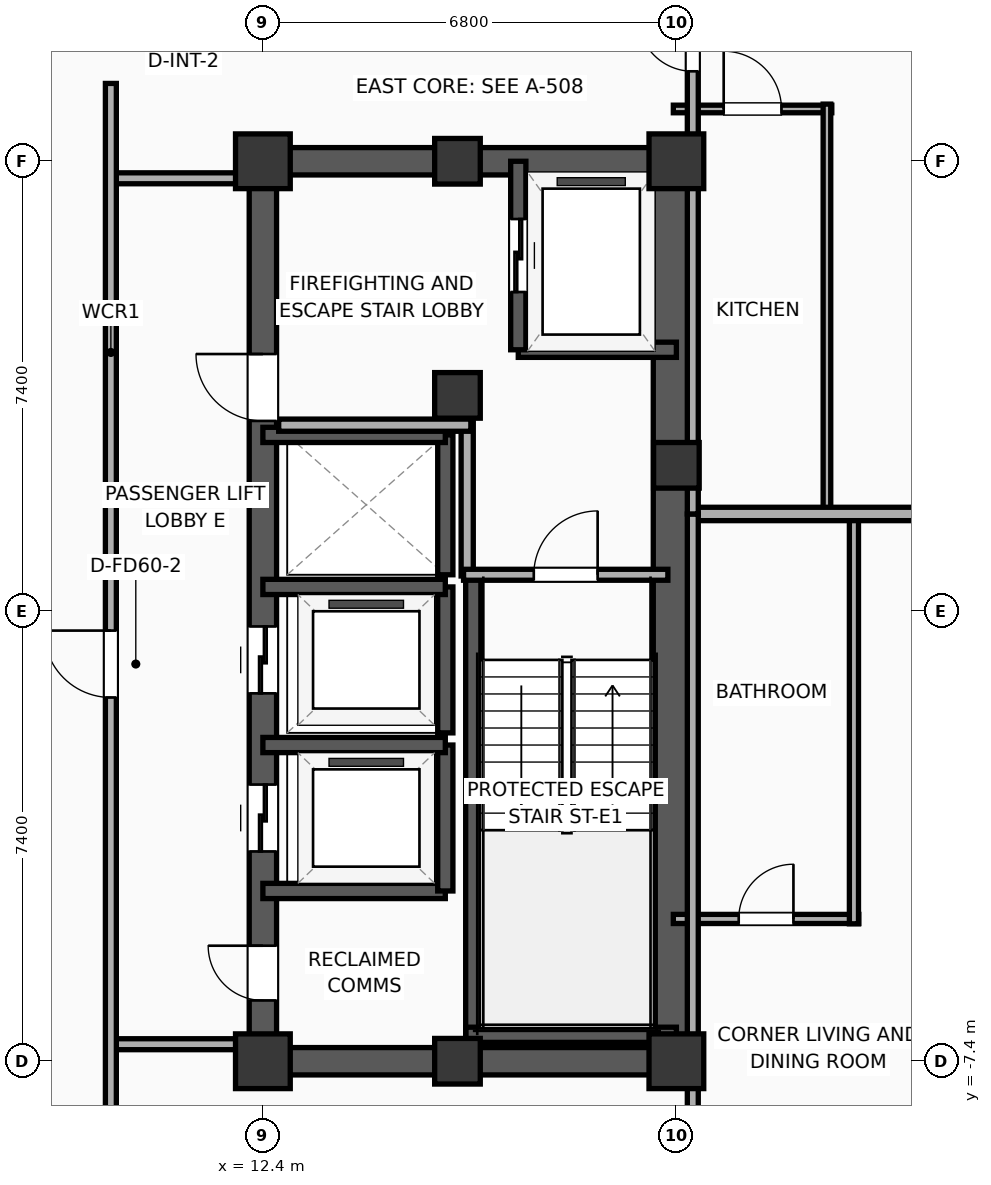
"""IFC4 building model, lengths in metres.
Left out: names, types, materials, properties, quantities, classifications, styles, units other than length and angle.
Written with IfcOpenShell. Run it as: python <this file> out.ifc"""

import sys

from ifc_helpers import new_model, si_unit, direction, frame, frame_2d, origin, origin_2d, place, context, subcontext, project, spatial, rectangle, extrude, element, fill, save


model = new_model("IFC4")
c1 = context("Model", 3, precision=1e-05, world=origin(), true_north=direction((0.0, 1.0)))
c2 = subcontext(c1, "Body", "Model", "MODEL_VIEW")
j1 = project(units=[si_unit("LENGTHUNIT", "METRE"), si_unit("PLANEANGLEUNIT", "RADIAN")], contexts=[c1])
p1 = place(None, origin())
s1 = spatial("IfcSite", under=j1, at=p1, CompositionType="ELEMENT")
p2 = place(p1, origin())
s2 = spatial("IfcBuilding", under=s1, at=p2, CompositionType="ELEMENT")
p3 = place(p2, frame((0.0, 0.0, 167.7)))
s3 = spatial("IfcBuildingStorey", under=s2, at=p3, CompositionType="ELEMENT", Elevation=167.7)
p4 = place(p3, frame((12.4, -7.4, 0.0), z_axis=(0.0, 0.0, 1.0), x_axis=(1.0, 0.0, 0.0)))
e1 = element("IfcColumn", 1, at=p4, inside=s3, PredefinedType="COLUMN", context=c2, shape_type="SweptSolid", body=[
    extrude(rectangle(XDim=0.9, YDim=0.9, at=origin_2d()), origin(), (0.0, 0.0, 1.0), 3.9),
])
p5 = place(p3, frame((15.6, 3.55, 0.0), z_axis=(0.0, 0.0, 1.0), x_axis=(1.0, 0.0, 0.0)))
e2 = element("IfcColumn", 2, at=p5, inside=s3, PredefinedType="COLUMN", context=c2, shape_type="SweptSolid", body=[
    extrude(rectangle(XDim=0.75, YDim=0.75, at=origin_2d()), origin(), (0.0, 0.0, 1.0), 3.9),
])
p6 = place(p3, frame((12.4, 7.4, 0.0), z_axis=(0.0, 0.0, 1.0), x_axis=(1.0, 0.0, 0.0)))
e3 = element("IfcColumn", 3, at=p6, inside=s3, PredefinedType="COLUMN", context=c2, shape_type="SweptSolid", body=[
    extrude(rectangle(XDim=0.9, YDim=0.9, at=origin_2d()), origin(), (0.0, 0.0, 1.0), 3.9),
])
for number, where, z_axis, x_axis in (
    (4, (15.6, -7.4, 0.0), (0.0, 0.0, 1.0), (1.0, 0.0, 0.0)),
    (5, (15.6, 7.4, 0.0), (0.0, 0.0, 1.0), (1.0, 0.0, 0.0)),
):
    element("IfcColumn", number, at=place(p3, frame(where, z_axis=z_axis, x_axis=x_axis)), inside=s3, PredefinedType="COLUMN", context=c2, shape_type="SweptSolid", body=[
        extrude(rectangle(XDim=0.75, YDim=0.75, at=origin_2d()), origin(), (0.0, 0.0, 1.0), 3.9),
    ])
p7 = place(p3, frame((19.2, -7.4, 0.0), z_axis=(0.0, 0.0, 1.0), x_axis=(1.0, 0.0, 0.0)))
e6 = element("IfcColumn", 6, at=p7, inside=s3, PredefinedType="COLUMN", context=c2, shape_type="SweptSolid", body=[
    extrude(rectangle(XDim=0.9, YDim=0.9, at=origin_2d()), origin(), (0.0, 0.0, 1.0), 3.9),
])
p8 = place(p3, frame((19.2, 2.4, 0.0), z_axis=(0.0, 0.0, 1.0), x_axis=(1.0, 0.0, 0.0)))
e7 = element("IfcColumn", 7, at=p8, inside=s3, PredefinedType="COLUMN", context=c2, shape_type="SweptSolid", body=[
    extrude(rectangle(XDim=0.75, YDim=0.75, at=origin_2d()), origin(), (0.0, 0.0, 1.0), 3.9),
])
p9 = place(p3, frame((19.2, 7.4, 0.0), z_axis=(0.0, 0.0, 1.0), x_axis=(1.0, 0.0, 0.0)))
e8 = element("IfcColumn", 8, at=p9, inside=s3, PredefinedType="COLUMN", context=c2, shape_type="SweptSolid", body=[
    extrude(rectangle(XDim=0.9, YDim=0.9, at=origin_2d()), origin(), (0.0, 0.0, 1.0), 3.9),
])
for number, where, z_axis, x_axis in (
    (9, (12.175, -7.4, 0.0), (0.0, 0.0, 1.0), (1.0, 0.0, 0.0)),
    (10, (12.175, 7.4, 0.0), (0.0, 0.0, 1.0), (1.0, 0.0, 0.0)),
):
    element("IfcWall", number, at=place(p3, frame(where, z_axis=z_axis, x_axis=x_axis)), inside=s3, PredefinedType="SHEAR", context=c2, shape_type="SweptSolid", body=[
        extrude(rectangle(XDim=7.25, YDim=0.45, at=frame_2d((3.625, 0.0))), origin(), (0.0, 0.0, 1.0), 3.65),
    ])
p10 = place(p3, frame((12.4, -7.4, 0.0), z_axis=(0.0, 0.0, 1.0), x_axis=(0.0, 1.0, 0.0)))
e11 = element("IfcWall", 11, at=p10, inside=s3, PredefinedType="SHEAR", context=c2, shape_type="SweptSolid", body=[
    extrude(rectangle(XDim=14.8, YDim=0.45, at=frame_2d((7.4, 0.0))), origin(), (0.0, 0.0, 1.0), 3.65),
])
p11 = place(p10, frame((3.45, 0.0, 0.0)))
e12 = element("IfcOpeningElement", 12, at=p11, cuts=e11, PredefinedType="OPENING", context=c2, shape_type="SweptSolid", body=[
    extrude(rectangle(XDim=1.1, YDim=2.05, at=frame_2d((0.55, 1.025))), frame((0.0, 0.235, 0.0), z_axis=(0.0, -1.0, 0.0), x_axis=(1.0, 0.0, 0.0)), (0.0, 0.0, 1.0), 0.47),
])
p12 = place(p10, frame((6.05, 0.0, 0.0)))
e13 = element("IfcOpeningElement", 13, at=p12, cuts=e11, PredefinedType="OPENING", context=c2, shape_type="SweptSolid", body=[
    extrude(rectangle(XDim=1.1, YDim=2.05, at=frame_2d((0.55, 1.025))), frame((0.0, 0.235, 0.0), z_axis=(0.0, -1.0, 0.0), x_axis=(1.0, 0.0, 0.0)), (0.0, 0.0, 1.0), 0.47),
])
p13 = place(p10, frame((10.53, 0.0, 0.0)))
e14 = element("IfcOpeningElement", 14, at=p13, cuts=e11, PredefinedType="OPENING", context=c2, shape_type="SweptSolid", body=[
    extrude(rectangle(XDim=1.1, YDim=2.05, at=frame_2d((0.55, 1.025))), frame((0.0, 0.235, 0.0), z_axis=(0.0, -1.0, 0.0), x_axis=(1.0, 0.0, 0.0)), (0.0, 0.0, 1.0), 0.47),
])
p14 = place(p10, frame((1.0, 0.0, 0.0)))
e15 = element("IfcOpeningElement", 15, at=p14, cuts=e11, PredefinedType="OPENING", context=c2, shape_type="SweptSolid", body=[
    extrude(rectangle(XDim=0.9, YDim=2.05, at=frame_2d((0.45, 1.025))), frame((0.0, 0.235, 0.0), z_axis=(0.0, -1.0, 0.0), x_axis=(1.0, 0.0, 0.0)), (0.0, 0.0, 1.0), 0.47),
])
p15 = place(p3, frame((19.145, -7.4, 0.0), z_axis=(0.0, 0.0, 1.0), x_axis=(0.0, 1.0, 0.0)))
e16 = element("IfcWall", 16, at=p15, inside=s3, PredefinedType="SHEAR", context=c2, shape_type="SweptSolid", body=[
    extrude(rectangle(XDim=14.8, YDim=0.65, at=frame_2d((7.4, 0.0))), origin(), (0.0, 0.0, 1.0), 3.65),
])
p16 = place(p3, frame((15.86, -7.085, 0.0), z_axis=(0.0, 0.0, 1.0), x_axis=(0.0, 1.0, 0.0)))
e17 = element("IfcWall", 17, at=p16, inside=s3, PredefinedType="SOLIDWALL", context=c2, shape_type="SweptSolid", body=[
    extrude(rectangle(XDim=7.685, YDim=0.25, at=frame_2d((3.843, 0.0))), origin(), (0.0, 0.0, 1.0), 3.65),
])
p17 = place(p3, frame((15.74, -6.965, 0.0), z_axis=(0.0, 0.0, 1.0), x_axis=(1.0, 0.0, 0.0)))
e18 = element("IfcWall", 18, at=p17, inside=s3, PredefinedType="SOLIDWALL", context=c2, shape_type="SweptSolid", body=[
    extrude(rectangle(XDim=3.46, YDim=0.25, at=frame_2d((1.73, 0.0))), origin(), (0.0, 0.0, 1.0), 3.65),
])
p18 = place(p3, frame((16.6, 4.3, 0.0), z_axis=(0.0, 0.0, 1.0), x_axis=(1.0, 0.0, 0.0)))
e19 = element("IfcWall", 19, at=p18, inside=s3, PredefinedType="SOLIDWALL", context=c2, shape_type="SweptSolid", body=[
    extrude(rectangle(XDim=2.6, YDim=0.25, at=frame_2d((1.3, 0.0))), origin(), (0.0, 0.0, 1.0), 3.65),
])
p19 = place(p3, frame((16.6, 7.4, 0.0), z_axis=(0.0, 0.0, 1.0), x_axis=(0.0, -1.0, 0.0)))
e20 = element("IfcWall", 20, at=p19, inside=s3, PredefinedType="SOLIDWALL", context=c2, shape_type="SweptSolid", body=[
    extrude(rectangle(XDim=3.1, YDim=0.25, at=frame_2d((1.55, 0.0))), origin(), (0.0, 0.0, 1.0), 3.65),
])
p20 = place(p19, frame((0.95, 0.0, 0.0)))
e21 = element("IfcOpeningElement", 21, at=p20, cuts=e20, PredefinedType="OPENING", context=c2, shape_type="SweptSolid", body=[
    extrude(rectangle(XDim=1.2, YDim=2.05, at=frame_2d((0.6, 1.025))), frame((0.0, 0.135, 0.0), z_axis=(0.0, -1.0, 0.0), x_axis=(1.0, 0.0, 0.0)), (0.0, 0.0, 1.0), 0.27),
])
p21 = place(p3, frame((12.4, -4.6, 0.0), z_axis=(0.0, 0.0, 1.0), x_axis=(1.0, 0.0, 0.0)))
e22 = element("IfcWall", 22, at=p21, inside=s3, PredefinedType="SOLIDWALL", context=c2, shape_type="SweptSolid", body=[
    extrude(rectangle(XDim=3.0, YDim=0.25, at=frame_2d((1.5, 0.0))), origin(), (0.0, 0.0, 1.0), 3.65),
])
p22 = place(p3, frame((15.4, -4.6, 0.0), z_axis=(0.0, 0.0, 1.0), x_axis=(0.0, 1.0, 0.0)))
e23 = element("IfcWall", 23, at=p22, inside=s3, PredefinedType="SOLIDWALL", context=c2, shape_type="SweptSolid", body=[
    extrude(rectangle(XDim=2.4, YDim=0.25, at=frame_2d((1.2, 0.0))), origin(), (0.0, 0.0, 1.0), 3.65),
])
p23 = place(p3, frame((15.4, -2.2, 0.0), z_axis=(0.0, 0.0, 1.0), x_axis=(-1.0, 0.0, 0.0)))
e24 = element("IfcWall", 24, at=p23, inside=s3, PredefinedType="SOLIDWALL", context=c2, shape_type="SweptSolid", body=[
    extrude(rectangle(XDim=3.0, YDim=0.25, at=frame_2d((1.5, 0.0))), origin(), (0.0, 0.0, 1.0), 3.65),
])
p24 = place(p3, frame((15.4, -2.0, 0.0), z_axis=(0.0, 0.0, 1.0), x_axis=(0.0, 1.0, 0.0)))
e25 = element("IfcWall", 25, at=p24, inside=s3, PredefinedType="SOLIDWALL", context=c2, shape_type="SweptSolid", body=[
    extrude(rectangle(XDim=2.4, YDim=0.25, at=frame_2d((1.2, 0.0))), origin(), (0.0, 0.0, 1.0), 3.65),
])
p25 = place(p3, frame((15.4, 0.4, 0.0), z_axis=(0.0, 0.0, 1.0), x_axis=(-1.0, 0.0, 0.0)))
e26 = element("IfcWall", 26, at=p25, inside=s3, PredefinedType="SOLIDWALL", context=c2, shape_type="SweptSolid", body=[
    extrude(rectangle(XDim=3.0, YDim=0.25, at=frame_2d((1.5, 0.0))), origin(), (0.0, 0.0, 1.0), 3.65),
])
p26 = place(p3, frame((15.4, 0.6, 0.0), z_axis=(0.0, 0.0, 1.0), x_axis=(0.0, 1.0, 0.0)))
e27 = element("IfcWall", 27, at=p26, inside=s3, PredefinedType="SOLIDWALL", context=c2, shape_type="SweptSolid", body=[
    extrude(rectangle(XDim=2.3, YDim=0.25, at=frame_2d((1.15, 0.0))), origin(), (0.0, 0.0, 1.0), 3.65),
])
p27 = place(p3, frame((15.4, 2.9, 0.0), z_axis=(0.0, 0.0, 1.0), x_axis=(-1.0, 0.0, 0.0)))
e28 = element("IfcWall", 28, at=p27, inside=s3, PredefinedType="SOLIDWALL", context=c2, shape_type="SweptSolid", body=[
    extrude(rectangle(XDim=3.0, YDim=0.25, at=frame_2d((1.5, 0.0))), origin(), (0.0, 0.0, 1.0), 3.65),
])
p28 = place(p3, frame((15.76, 0.58, 0.0), z_axis=(0.0, 0.0, 1.0), x_axis=(0.0, 1.0, 0.0)))
e29 = element("IfcWall", 29, at=p28, inside=s3, PredefinedType="PARTITIONING", context=c2, shape_type="SweptSolid", body=[
    extrude(rectangle(XDim=2.52, YDim=0.2, at=frame_2d((1.26, 0.0))), origin(), (0.0, 0.0, 1.0), 3.65),
])
p29 = place(p3, frame((12.66, 3.06, 0.0), z_axis=(0.0, 0.0, 1.0), x_axis=(1.0, 0.0, 0.0)))
e30 = element("IfcWall", 30, at=p29, inside=s3, PredefinedType="PARTITIONING", context=c2, shape_type="SweptSolid", body=[
    extrude(rectangle(XDim=3.16, YDim=0.2, at=frame_2d((1.58, 0.0))), origin(), (0.0, 0.0, 1.0), 3.65),
])
p30 = place(p3, frame((15.7, 0.6, 0.0), z_axis=(0.0, 0.0, 1.0), x_axis=(1.0, 0.0, 0.0)))
e31 = element("IfcWall", 31, at=p30, inside=s3, PredefinedType="PARTITIONING", context=c2, shape_type="SweptSolid", body=[
    extrude(rectangle(XDim=3.36, YDim=0.18, at=frame_2d((1.68, 0.0))), origin(), (0.0, 0.0, 1.0), 3.65),
])
p31 = place(p30, frame((1.155, 0.0, 0.0)))
e32 = element("IfcOpeningElement", 32, at=p31, cuts=e31, PredefinedType="OPENING", context=c2, shape_type="SweptSolid", body=[
    extrude(rectangle(XDim=1.05, YDim=2.05, at=frame_2d((0.525, 1.025))), frame((0.0, 0.1, 0.0), z_axis=(0.0, -1.0, 0.0), x_axis=(1.0, 0.0, 0.0)), (0.0, 0.0, 1.0), 0.2),
])
for number, where, z_axis, x_axis in (
    (33, (9.88, 7.12, 0.0), (0.0, 0.0, 1.0), (1.0, 0.0, 0.0)),
    (34, (9.88, -7.12, 0.0), (0.0, 0.0, 1.0), (1.0, 0.0, 0.0)),
):
    element("IfcWall", number, at=place(p3, frame(where, z_axis=z_axis, x_axis=x_axis)), inside=s3, PredefinedType="PARTITIONING", context=c2, shape_type="SweptSolid", body=[
        extrude(rectangle(XDim=2.27, YDim=0.18, at=frame_2d((1.135, 0.0))), origin(), (0.0, 0.0, 1.0), 3.65),
    ])
p32 = place(p3, frame((9.9, -8.68, 0.0), z_axis=(0.0, 0.0, 1.0), x_axis=(0.0, 1.0, 0.0)))
e35 = element("IfcWall", 35, at=p32, inside=s3, PredefinedType="PARTITIONING", context=c2, shape_type="SweptSolid", body=[
    extrude(rectangle(XDim=17.36, YDim=0.18, at=frame_2d((8.68, 0.0))), origin(), (0.0, 0.0, 1.0), 3.65),
])
p33 = place(p32, frame((7.262, 0.0, 0.0)))
e36 = element("IfcOpeningElement", 36, at=p33, cuts=e35, PredefinedType="OPENING", context=c2, shape_type="SweptSolid", body=[
    extrude(rectangle(XDim=1.1, YDim=2.05, at=frame_2d((0.55, 1.025))), frame((0.0, 0.1, 0.0), z_axis=(0.0, -1.0, 0.0), x_axis=(1.0, 0.0, 0.0)), (0.0, 0.0, 1.0), 0.2),
])
p34 = place(p3, frame((19.15, -5.06, 0.0), z_axis=(0.0, 0.0, 1.0), x_axis=(1.0, 0.0, 0.0)))
e37 = element("IfcWall", 37, at=p34, inside=s3, PredefinedType="PLUMBINGWALL", context=c2, shape_type="SweptSolid", body=[
    extrude(rectangle(XDim=3.05, YDim=0.15, at=frame_2d((1.525, 0.0))), origin(), (0.0, 0.0, 1.0), 3.65),
])
p35 = place(p34, frame((1.075, 0.0, 0.0)))
e38 = element("IfcOpeningElement", 38, at=p35, cuts=e37, PredefinedType="OPENING", context=c2, shape_type="SweptSolid", body=[
    extrude(rectangle(XDim=0.9, YDim=2.05, at=frame_2d((0.45, 1.025))), frame((0.0, 0.085, 0.0), z_axis=(0.0, -1.0, 0.0), x_axis=(1.0, 0.0, 0.0)), (0.0, 0.0, 1.0), 0.17),
])
p36 = place(p3, frame((22.12, -5.14, 0.0), z_axis=(0.0, 0.0, 1.0), x_axis=(0.0, 1.0, 0.0)))
e39 = element("IfcWall", 39, at=p36, inside=s3, PredefinedType="PLUMBINGWALL", context=c2, shape_type="SweptSolid", body=[
    extrude(rectangle(XDim=6.72, YDim=0.15, at=frame_2d((3.36, 0.0))), origin(), (0.0, 0.0, 1.0), 3.65),
])
p37 = place(p3, frame((19.15, 8.26, 0.0), z_axis=(0.0, 0.0, 1.0), x_axis=(1.0, 0.0, 0.0)))
e40 = element("IfcWall", 40, at=p37, inside=s3, PredefinedType="PARTITIONING", context=c2, shape_type="SweptSolid", body=[
    extrude(rectangle(XDim=2.606, YDim=0.125, at=frame_2d((1.303, 0.0))), origin(), (0.0, 0.0, 1.0), 3.04),
])
p38 = place(p37, frame((0.828, 0.0, 0.0)))
e41 = element("IfcOpeningElement", 41, at=p38, cuts=e40, PredefinedType="OPENING", context=c2, shape_type="SweptSolid", body=[
    extrude(rectangle(XDim=0.95, YDim=2.05, at=frame_2d((0.475, 1.025))), frame((0.0, 0.073, 0.0), z_axis=(0.0, -1.0, 0.0), x_axis=(1.0, 0.0, 0.0)), (0.0, 0.0, 1.0), 0.145),
])
p39 = place(p3, frame((21.676, 1.62, 0.0), z_axis=(0.0, 0.0, 1.0), x_axis=(0.0, 1.0, 0.0)))
e42 = element("IfcWall", 42, at=p39, inside=s3, PredefinedType="PARTITIONING", context=c2, shape_type="SweptSolid", body=[
    extrude(rectangle(XDim=6.72, YDim=0.125, at=frame_2d((3.36, 0.0))), origin(), (0.0, 0.0, 1.0), 3.65),
])
p40 = place(p3, frame((19.47, 1.6, 0.0), z_axis=(0.0, 0.0, 1.0), x_axis=(1.0, 0.0, 0.0)))
e43 = element("IfcWall", 43, at=p40, inside=s3, PredefinedType="PARTITIONING", context=c2, shape_type="SweptSolid", body=[
    extrude(rectangle(XDim=6.892, YDim=0.22, at=frame_2d((3.446, 0.0))), origin(), (0.0, 0.0, 1.0), 3.65),
])
p41 = place(p3, frame((19.47, -18.559, 0.0), z_axis=(0.0, 0.0, 1.0), x_axis=(0.0, 1.0, 0.0)))
e44 = element("IfcWall", 44, at=p41, inside=s3, PredefinedType="PARTITIONING", context=c2, shape_type="SweptSolid", body=[
    extrude(rectangle(XDim=20.159, YDim=0.18, at=frame_2d((10.079, 0.0))), origin(), (0.0, 0.0, 1.0), 3.65),
])
p42 = place(p41, frame((8.779, 0.0, 0.0)))
e45 = element("IfcOpeningElement", 45, at=p42, cuts=e44, PredefinedType="OPENING", context=c2, shape_type="SweptSolid", body=[
    extrude(rectangle(XDim=0.9, YDim=2.05, at=frame_2d((0.45, 1.025))), frame((0.0, 0.1, 0.0), z_axis=(0.0, -1.0, 0.0), x_axis=(1.0, 0.0, 0.0)), (0.0, 0.0, 1.0), 0.2),
])
p43 = place(p3, frame((19.47, 1.6, 0.0), z_axis=(0.0, 0.0, 1.0), x_axis=(0.0, 1.0, 0.0)))
e46 = element("IfcWall", 46, at=p43, inside=s3, PredefinedType="PARTITIONING", context=c2, shape_type="SweptSolid", body=[
    extrude(rectangle(XDim=20.524, YDim=0.18, at=frame_2d((10.262, 0.0))), origin(), (0.0, 0.0, 1.0), 3.04),
])
p44 = place(p43, frame((7.279, 0.0, 0.0)))
e47 = element("IfcOpeningElement", 47, at=p44, cuts=e46, PredefinedType="OPENING", context=c2, shape_type="SweptSolid", body=[
    extrude(rectangle(XDim=0.9, YDim=2.05, at=frame_2d((0.45, 1.025))), frame((0.0, 0.1, 0.0), z_axis=(0.0, -1.0, 0.0), x_axis=(1.0, 0.0, 0.0)), (0.0, 0.0, 1.0), 0.2),
])
p45 = place(p20, origin())
e48 = element("IfcDoor", 48, at=p45, inside=s3, OperationType="SLIDING_TO_LEFT", PredefinedType="DOOR", context=c2, shape_type="SweptSolid", body=[
    extrude(rectangle(XDim=1.2, YDim=2.05, at=frame_2d((0.6, 1.025))), frame((0.0, 0.025, 0.0), z_axis=(0.0, -1.0, 0.0), x_axis=(1.0, 0.0, 0.0)), (0.0, 0.0, 1.0), 0.05),
])
fill(e21, e48)
p46 = place(p11, origin())
e49 = element("IfcDoor", 49, at=p46, inside=s3, OperationType="SLIDING_TO_LEFT", PredefinedType="DOOR", context=c2, shape_type="SweptSolid", body=[
    extrude(rectangle(XDim=1.1, YDim=2.05, at=frame_2d((0.55, 1.025))), frame((0.0, 0.025, 0.0), z_axis=(0.0, -1.0, 0.0), x_axis=(1.0, 0.0, 0.0)), (0.0, 0.0, 1.0), 0.05),
])
fill(e12, e49)
p47 = place(p12, origin())
e50 = element("IfcDoor", 50, at=p47, inside=s3, OperationType="SLIDING_TO_LEFT", PredefinedType="DOOR", context=c2, shape_type="SweptSolid", body=[
    extrude(rectangle(XDim=1.1, YDim=2.05, at=frame_2d((0.55, 1.025))), frame((0.0, 0.025, 0.0), z_axis=(0.0, -1.0, 0.0), x_axis=(1.0, 0.0, 0.0)), (0.0, 0.0, 1.0), 0.05),
])
fill(e13, e50)
p48 = place(p31, origin())
e51 = element("IfcDoor", 51, at=p48, inside=s3, OperationType="SINGLE_SWING_RIGHT", PredefinedType="DOOR", context=c2, shape_type="SweptSolid", body=[
    extrude(rectangle(XDim=1.05, YDim=2.05, at=frame_2d((0.525, 1.025))), frame((0.0, 0.025, 0.0), z_axis=(0.0, -1.0, 0.0), x_axis=(1.0, 0.0, 0.0)), (0.0, 0.0, 1.0), 0.05),
])
fill(e32, e51)
p49 = place(p33, origin())
e52 = element("IfcDoor", 52, at=p49, inside=s3, OperationType="SINGLE_SWING_RIGHT", PredefinedType="DOOR", context=c2, shape_type="SweptSolid", body=[
    extrude(rectangle(XDim=1.1, YDim=2.05, at=frame_2d((0.55, 1.025))), frame((0.0, 0.025, 0.0), z_axis=(0.0, -1.0, 0.0), x_axis=(1.0, 0.0, 0.0)), (0.0, 0.0, 1.0), 0.05),
])
fill(e36, e52)
p50 = place(p35, origin())
e53 = element("IfcDoor", 53, at=p50, inside=s3, OperationType="SINGLE_SWING_RIGHT", PredefinedType="DOOR", context=c2, shape_type="SweptSolid", body=[
    extrude(rectangle(XDim=0.9, YDim=2.05, at=frame_2d((0.45, 1.025))), frame((0.0, 0.025, 0.0), z_axis=(0.0, -1.0, 0.0), x_axis=(1.0, 0.0, 0.0)), (0.0, 0.0, 1.0), 0.05),
])
fill(e38, e53)
p51 = place(p38, origin())
e54 = element("IfcDoor", 54, at=p51, inside=s3, OperationType="SINGLE_SWING_LEFT", PredefinedType="DOOR", context=c2, shape_type="SweptSolid", body=[
    extrude(rectangle(XDim=0.95, YDim=2.05, at=frame_2d((0.475, 1.025))), frame((0.0, 0.025, 0.0), z_axis=(0.0, -1.0, 0.0), x_axis=(1.0, 0.0, 0.0)), (0.0, 0.0, 1.0), 0.05),
])
fill(e41, e54)
p52 = place(p44, origin())
e55 = element("IfcDoor", 55, at=p52, inside=s3, OperationType="SINGLE_SWING_RIGHT", PredefinedType="DOOR", context=c2, shape_type="SweptSolid", body=[
    extrude(rectangle(XDim=0.9, YDim=2.05, at=frame_2d((0.45, 1.025))), frame((0.0, 0.025, 0.0), z_axis=(0.0, -1.0, 0.0), x_axis=(1.0, 0.0, 0.0)), (0.0, 0.0, 1.0), 0.05),
])
fill(e47, e55)
p53 = place(p13, origin())
e56 = element("IfcDoor", 56, at=p53, inside=s3, OperationType="SINGLE_SWING_RIGHT", PredefinedType="DOOR", context=c2, shape_type="SweptSolid", body=[
    extrude(rectangle(XDim=1.1, YDim=2.05, at=frame_2d((0.55, 1.025))), frame((0.0, 0.025, 0.0), z_axis=(0.0, -1.0, 0.0), x_axis=(1.0, 0.0, 0.0)), (0.0, 0.0, 1.0), 0.05),
])
fill(e14, e56)
p54 = place(p14, origin())
e57 = element("IfcDoor", 57, at=p54, inside=s3, OperationType="SINGLE_SWING_RIGHT", PredefinedType="DOOR", context=c2, shape_type="SweptSolid", body=[
    extrude(rectangle(XDim=0.9, YDim=2.05, at=frame_2d((0.45, 1.025))), frame((0.0, 0.025, 0.0), z_axis=(0.0, -1.0, 0.0), x_axis=(1.0, 0.0, 0.0)), (0.0, 0.0, 1.0), 0.05),
])
fill(e15, e57)
save(model, sys.argv[1])
